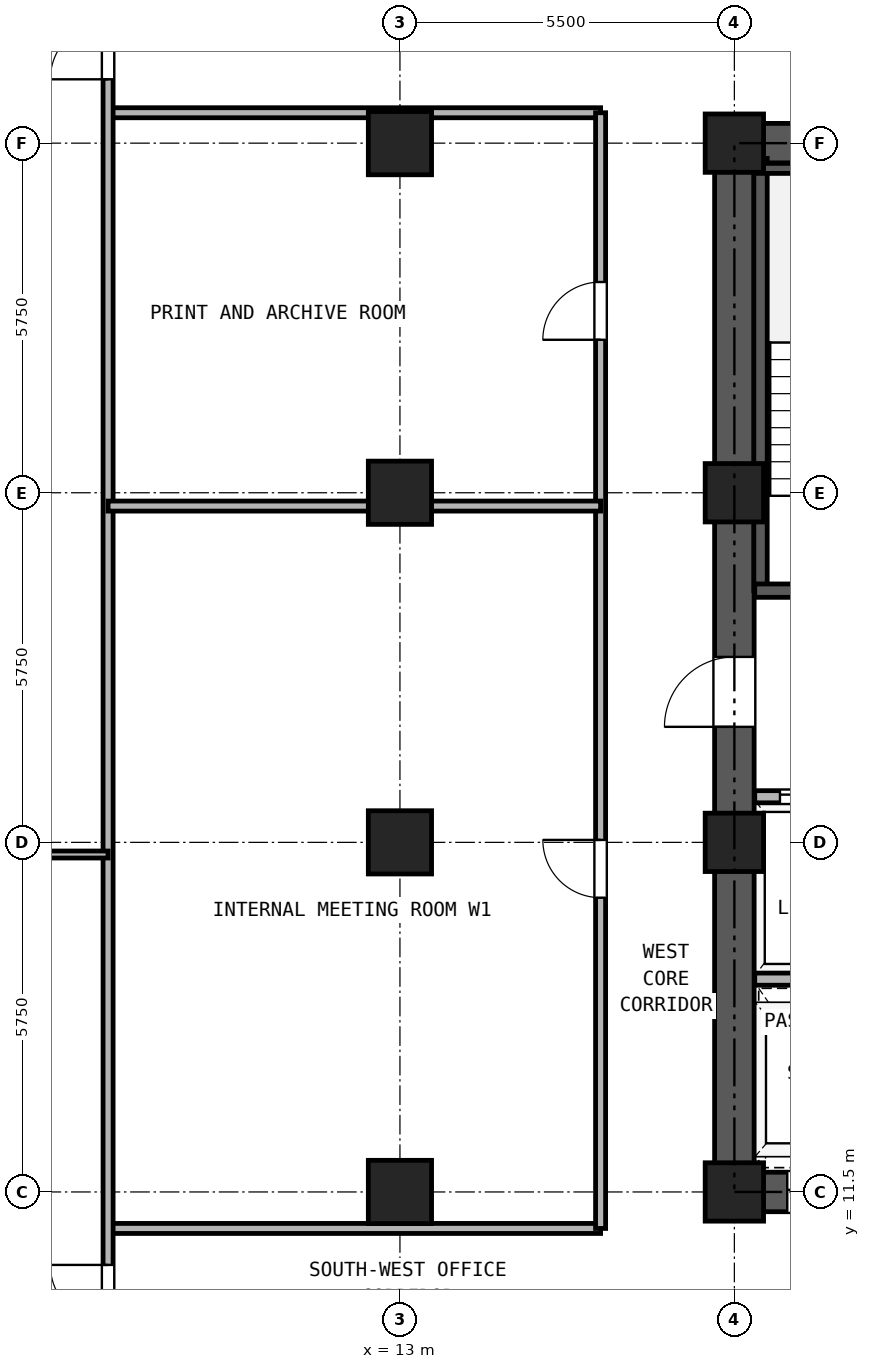
"""IFC4 building model, lengths in metres.
Left out: names, types, materials, properties, quantities, classifications, styles, units other than length and angle.
Written with IfcOpenShell. Run it as: python <this file> out.ifc"""

import sys

from ifc_helpers import new_model, si_unit, direction, frame, frame_2d, origin, origin_2d, place, context, subcontext, project, spatial, rectangle, hollow_rectangle, extrude, source, transform, mapped, element, fill, save


model = new_model("IFC4")
c1 = context("Model", 3, precision=1e-05, world=origin(), true_north=direction((0.0, 1.0)))
c2 = subcontext(c1, "Body", "Model", "MODEL_VIEW")
j1 = project(units=[si_unit("LENGTHUNIT", "METRE"), si_unit("PLANEANGLEUNIT", "RADIAN")], contexts=[c1])
p1 = place(None, origin())
s1 = spatial("IfcSite", under=j1, at=p1, CompositionType="ELEMENT")
p2 = place(p1, origin())
s2 = spatial("IfcBuilding", under=s1, at=p2, CompositionType="ELEMENT")
p3 = place(p2, frame((0.0, 0.0, 22.5)))
s3 = spatial("IfcBuildingStorey", under=s2, at=p3, CompositionType="ELEMENT", Elevation=22.5)
m1 = source(origin(), c2, "Body", "SweptSolid", [
    extrude(hollow_rectangle(XDim=1.04, YDim=1.04, WallThickness=0.065, at=origin_2d()), origin(), (0.0, 0.0, 1.0), 3.32),
])
for number, where, z_axis, x_axis in (
    (1, (13.0, 11.5, 0.0), (0.0, 0.0, 1.0), (1.0, 0.0, 0.0)),
    (2, (13.0, 17.25, 0.0), (0.0, 0.0, 1.0), (1.0, 0.0, 0.0)),
    (3, (13.0, 23.0, 0.0), (0.0, 0.0, 1.0), (1.0, 0.0, 0.0)),
    (4, (13.0, 28.75, 0.0), (0.0, 0.0, 1.0), (1.0, 0.0, 0.0)),
):
    element("IfcColumn", number, at=place(p3, frame(where, z_axis=z_axis, x_axis=x_axis)), inside=s3, PredefinedType="COLUMN", context=c2, shape_type="MappedRepresentation", body=[
        mapped(m1, transform((0.0, 0.0, 0.0), x_axis=(1.0, 0.0, 0.0), y_axis=(0.0, 1.0, 0.0), z_axis=(0.0, 0.0, 1.0), scale=1.0)),
    ])
m2 = source(origin(), c2, "Body", "SweptSolid", [
    extrude(hollow_rectangle(XDim=0.96, YDim=0.96, WallThickness=0.06, at=origin_2d()), origin(), (0.0, 0.0, 1.0), 3.32),
])
for number, where, z_axis, x_axis in (
    (5, (18.5, 11.5, 0.0), (0.0, 0.0, 1.0), (1.0, 0.0, 0.0)),
    (6, (18.5, 17.25, 0.0), (0.0, 0.0, 1.0), (1.0, 0.0, 0.0)),
    (7, (18.5, 23.0, 0.0), (0.0, 0.0, 1.0), (1.0, 0.0, 0.0)),
    (8, (18.5, 28.75, 0.0), (0.0, 0.0, 1.0), (1.0, 0.0, 0.0)),
):
    element("IfcColumn", number, at=place(p3, frame(where, z_axis=z_axis, x_axis=x_axis)), inside=s3, PredefinedType="COLUMN", context=c2, shape_type="MappedRepresentation", body=[
        mapped(m2, transform((0.0, 0.0, 0.0), x_axis=(1.0, 0.0, 0.0), y_axis=(0.0, 1.0, 0.0), z_axis=(0.0, 0.0, 1.0), scale=1.0)),
    ])
p4 = place(p3, frame((18.175, 11.5, 0.0), z_axis=(0.0, 0.0, 1.0), x_axis=(1.0, 0.0, 0.0)))
e9 = element("IfcWall", 9, at=p4, inside=s3, PredefinedType="SHEAR", context=c2, shape_type="SweptSolid", body=[
    extrude(rectangle(XDim=10.65, YDim=0.65, at=frame_2d((5.325, 0.0))), origin(), (0.0, 0.0, 1.0), 3.32),
])
p5 = place(p4, frame((1.195, 0.0, 0.0)))
e10 = element("IfcOpeningElement", 10, at=p5, cuts=e9, PredefinedType="OPENING", context=c2, shape_type="SweptSolid", body=[
    extrude(rectangle(XDim=1.1, YDim=2.25, at=frame_2d((0.55, 1.125))), frame((0.0, 0.335, 0.0), z_axis=(0.0, -1.0, 0.0), x_axis=(1.0, 0.0, 0.0)), (0.0, 0.0, 1.0), 0.67),
])
p6 = place(p4, frame((3.495, 0.0, 0.0)))
e11 = element("IfcOpeningElement", 11, at=p6, cuts=e9, PredefinedType="OPENING", context=c2, shape_type="SweptSolid", body=[
    extrude(rectangle(XDim=1.1, YDim=2.25, at=frame_2d((0.55, 1.125))), frame((0.0, 0.335, 0.0), z_axis=(0.0, -1.0, 0.0), x_axis=(1.0, 0.0, 0.0)), (0.0, 0.0, 1.0), 0.67),
])
p7 = place(p4, frame((5.925, 0.0, 0.0)))
e12 = element("IfcOpeningElement", 12, at=p7, cuts=e9, PredefinedType="OPENING", context=c2, shape_type="SweptSolid", body=[
    extrude(rectangle(XDim=1.1, YDim=2.25, at=frame_2d((0.55, 1.125))), frame((0.0, 0.335, 0.0), z_axis=(0.0, -1.0, 0.0), x_axis=(1.0, 0.0, 0.0)), (0.0, 0.0, 1.0), 0.67),
])
p8 = place(p4, frame((8.325, 0.0, 0.0)))
e13 = element("IfcOpeningElement", 13, at=p8, cuts=e9, PredefinedType="OPENING", context=c2, shape_type="SweptSolid", body=[
    extrude(rectangle(XDim=1.1, YDim=2.25, at=frame_2d((0.55, 1.125))), frame((0.0, 0.335, 0.0), z_axis=(0.0, -1.0, 0.0), x_axis=(1.0, 0.0, 0.0)), (0.0, 0.0, 1.0), 0.67),
])
p9 = place(p3, frame((18.175, 28.75, 0.0), z_axis=(0.0, 0.0, 1.0), x_axis=(1.0, 0.0, 0.0)))
e14 = element("IfcWall", 14, at=p9, inside=s3, PredefinedType="SHEAR", context=c2, shape_type="SweptSolid", body=[
    extrude(rectangle(XDim=10.65, YDim=0.65, at=frame_2d((5.325, 0.0))), origin(), (0.0, 0.0, 1.0), 3.32),
])
p10 = place(p9, frame((4.205, 0.0, 0.0)))
e15 = element("IfcOpeningElement", 15, at=p10, cuts=e14, PredefinedType="OPENING", context=c2, shape_type="SweptSolid", body=[
    extrude(rectangle(XDim=0.9, YDim=2.05, at=frame_2d((0.45, 1.025))), frame((0.0, 0.335, 0.0), z_axis=(0.0, -1.0, 0.0), x_axis=(1.0, 0.0, 0.0)), (0.0, 0.0, 1.0), 0.67),
])
p11 = place(p9, frame((5.745, 0.0, 0.0)))
e16 = element("IfcOpeningElement", 16, at=p11, cuts=e14, PredefinedType="OPENING", context=c2, shape_type="SweptSolid", body=[
    extrude(rectangle(XDim=0.9, YDim=2.05, at=frame_2d((0.45, 1.025))), frame((0.0, 0.335, 0.0), z_axis=(0.0, -1.0, 0.0), x_axis=(1.0, 0.0, 0.0)), (0.0, 0.0, 1.0), 0.67),
])
p12 = place(p3, frame((18.5, 11.825, 0.0), z_axis=(0.0, 0.0, 1.0), x_axis=(0.0, 1.0, 0.0)))
e17 = element("IfcWall", 17, at=p12, inside=s3, PredefinedType="SHEAR", context=c2, shape_type="SweptSolid", body=[
    extrude(rectangle(XDim=16.6, YDim=0.65, at=frame_2d((8.3, 0.0))), origin(), (0.0, 0.0, 1.0), 3.32),
])
p13 = place(p12, frame((7.325, 0.0, 0.0)))
e18 = element("IfcOpeningElement", 18, at=p13, cuts=e17, PredefinedType="OPENING", context=c2, shape_type="SweptSolid", body=[
    extrude(rectangle(XDim=1.15, YDim=2.2, at=frame_2d((0.575, 1.1))), frame((0.0, 0.335, 0.0), z_axis=(0.0, -1.0, 0.0), x_axis=(1.0, 0.0, 0.0)), (0.0, 0.0, 1.0), 0.67),
])
p14 = place(p3, frame((18.93, 21.39, 0.0), z_axis=(0.0, 0.0, 1.0), x_axis=(0.0, 1.0, 0.0)))
e19 = element("IfcWall", 19, at=p14, inside=s3, PredefinedType="SOLIDWALL", context=c2, shape_type="SweptSolid", body=[
    extrude(rectangle(XDim=7.11, YDim=0.22, at=frame_2d((3.555, 0.0))), origin(), (0.0, 0.0, 1.0), 3.32),
])
p15 = place(p3, frame((18.835, 28.335, 0.0), z_axis=(0.0, 0.0, 1.0), x_axis=(1.0, 0.0, 0.0)))
e20 = element("IfcWall", 20, at=p15, inside=s3, PredefinedType="PARTITIONING", context=c2, shape_type="SweptSolid", body=[
    extrude(rectangle(XDim=3.275, YDim=0.165, at=frame_2d((1.638, 0.0))), origin(), (0.0, 0.0, 1.0), 3.32),
])
p16 = place(p3, frame((18.835, 21.39, 0.0), z_axis=(0.0, 0.0, 1.0), x_axis=(1.0, 0.0, 0.0)))
e21 = element("IfcWall", 21, at=p16, inside=s3, PredefinedType="SOLIDWALL", context=c2, shape_type="SweptSolid", body=[
    extrude(rectangle(XDim=6.295, YDim=0.22, at=frame_2d((3.147, 0.0))), origin(), (0.0, 0.0, 1.0), 3.32),
])
p17 = place(p16, frame((1.015, 0.0, 0.0)))
e22 = element("IfcOpeningElement", 22, at=p17, cuts=e21, PredefinedType="OPENING", context=c2, shape_type="SweptSolid", body=[
    extrude(rectangle(XDim=1.15, YDim=2.2, at=frame_2d((0.575, 1.1))), frame((0.0, 0.12, 0.0), z_axis=(0.0, -1.0, 0.0), x_axis=(1.0, 0.0, 0.0)), (0.0, 0.0, 1.0), 0.24),
])
p18 = place(p16, frame((4.745, 0.0, 0.0)))
e23 = element("IfcOpeningElement", 23, at=p18, cuts=e21, PredefinedType="OPENING", context=c2, shape_type="SweptSolid", body=[
    extrude(rectangle(XDim=1.1, YDim=2.25, at=frame_2d((0.55, 1.125))), frame((0.0, 0.12, 0.0), z_axis=(0.0, -1.0, 0.0), x_axis=(1.0, 0.0, 0.0)), (0.0, 0.0, 1.0), 0.24),
])
p19 = place(p3, frame((18.835, 18.0, 0.0), z_axis=(0.0, 0.0, 1.0), x_axis=(1.0, 0.0, 0.0)))
e24 = element("IfcWall", 24, at=p19, inside=s3, PredefinedType="PARTITIONING", context=c2, shape_type="SweptSolid", body=[
    extrude(rectangle(XDim=9.33, YDim=0.2, at=frame_2d((4.665, 0.0))), origin(), (0.0, 0.0, 1.0), 3.32),
])
p20 = place(p19, frame((0.415, 0.0, 0.0)))
e25 = element("IfcOpeningElement", 25, at=p20, cuts=e24, PredefinedType="OPENING", context=c2, shape_type="SweptSolid", body=[
    extrude(rectangle(XDim=1.3, YDim=2.3, at=frame_2d((0.65, 1.15))), frame((0.0, 0.11, 0.0), z_axis=(0.0, -1.0, 0.0), x_axis=(1.0, 0.0, 0.0)), (0.0, 0.0, 1.0), 0.22),
])
p21 = place(p19, frame((2.515, 0.0, 0.0)))
e26 = element("IfcOpeningElement", 26, at=p21, cuts=e24, PredefinedType="OPENING", context=c2, shape_type="SweptSolid", body=[
    extrude(rectangle(XDim=1.3, YDim=2.3, at=frame_2d((0.65, 1.15))), frame((0.0, 0.11, 0.0), z_axis=(0.0, -1.0, 0.0), x_axis=(1.0, 0.0, 0.0)), (0.0, 0.0, 1.0), 0.22),
])
p22 = place(p19, frame((7.015, 0.0, 0.0)))
e27 = element("IfcOpeningElement", 27, at=p22, cuts=e24, PredefinedType="OPENING", context=c2, shape_type="SweptSolid", body=[
    extrude(rectangle(XDim=1.0, YDim=2.15, at=frame_2d((0.5, 1.075))), frame((0.0, 0.11, 0.0), z_axis=(0.0, -1.0, 0.0), x_axis=(1.0, 0.0, 0.0)), (0.0, 0.0, 1.0), 0.22),
])
p23 = place(p3, frame((18.835, 15.0, 0.0), z_axis=(0.0, 0.0, 1.0), x_axis=(1.0, 0.0, 0.0)))
e28 = element("IfcWall", 28, at=p23, inside=s3, PredefinedType="PARTITIONING", context=c2, shape_type="SweptSolid", body=[
    extrude(rectangle(XDim=9.33, YDim=0.2, at=frame_2d((4.665, 0.0))), origin(), (0.0, 0.0, 1.0), 3.32),
])
for number, where, z_axis, x_axis in (
    (29, (8.2, 10.9, 0.0), (0.0, 0.0, 1.0), (1.0, 0.0, 0.0)),
    (30, (8.2, 29.25, 0.0), (0.0, 0.0, 1.0), (1.0, 0.0, 0.0)),
):
    element("IfcWall", number, at=place(p3, frame(where, z_axis=z_axis, x_axis=x_axis)), inside=s3, PredefinedType="PARTITIONING", context=c2, shape_type="SweptSolid", body=[
        extrude(rectangle(XDim=8.1, YDim=0.165, at=frame_2d((4.05, 0.0))), origin(), (0.0, 0.0, 1.0), 3.32),
    ])
p24 = place(p3, frame((16.3, 10.9, 0.0), z_axis=(0.0, 0.0, 1.0), x_axis=(0.0, 1.0, 0.0)))
e31 = element("IfcWall", 31, at=p24, inside=s3, PredefinedType="PARTITIONING", context=c2, shape_type="SweptSolid", body=[
    extrude(rectangle(XDim=18.35, YDim=0.165, at=frame_2d((9.175, 0.0))), origin(), (0.0, 0.0, 1.0), 3.32),
])
p25 = place(p24, frame((5.44, 0.0, 0.0)))
e32 = element("IfcOpeningElement", 32, at=p25, cuts=e31, PredefinedType="OPENING", context=c2, shape_type="SweptSolid", body=[
    extrude(rectangle(XDim=0.95, YDim=2.15, at=frame_2d((0.475, 1.075))), frame((0.0, 0.093, 0.0), z_axis=(0.0, -1.0, 0.0), x_axis=(1.0, 0.0, 0.0)), (0.0, 0.0, 1.0), 0.185),
])
p26 = place(p24, frame((14.616, 0.0, 0.0)))
e33 = element("IfcOpeningElement", 33, at=p26, cuts=e31, PredefinedType="OPENING", context=c2, shape_type="SweptSolid", body=[
    extrude(rectangle(XDim=0.95, YDim=2.15, at=frame_2d((0.475, 1.075))), frame((0.0, 0.093, 0.0), z_axis=(0.0, -1.0, 0.0), x_axis=(1.0, 0.0, 0.0)), (0.0, 0.0, 1.0), 0.185),
])
p27 = place(p3, frame((8.2, 0.16, 0.0), z_axis=(0.0, 0.0, 1.0), x_axis=(0.0, 1.0, 0.0)))
e34 = element("IfcWall", 34, at=p27, inside=s3, PredefinedType="PARTITIONING", context=c2, shape_type="SweptSolid", body=[
    extrude(rectangle(XDim=40.18, YDim=0.165, at=frame_2d((20.09, 0.0))), origin(), (0.0, 0.0, 1.0), 3.32),
])
p28 = place(p27, frame((9.19, 0.0, 0.0)))
e35 = element("IfcOpeningElement", 35, at=p28, cuts=e34, PredefinedType="OPENING", context=c2, shape_type="SweptSolid", body=[
    extrude(rectangle(XDim=0.95, YDim=2.15, at=frame_2d((0.475, 1.075))), frame((0.0, 0.093, 0.0), z_axis=(0.0, -1.0, 0.0), x_axis=(1.0, 0.0, 0.0)), (0.0, 0.0, 1.0), 0.185),
])
p29 = place(p27, frame((29.64, 0.0, 0.0)))
e36 = element("IfcOpeningElement", 36, at=p29, cuts=e34, PredefinedType="OPENING", context=c2, shape_type="SweptSolid", body=[
    extrude(rectangle(XDim=0.95, YDim=2.15, at=frame_2d((0.475, 1.075))), frame((0.0, 0.093, 0.0), z_axis=(0.0, -1.0, 0.0), x_axis=(1.0, 0.0, 0.0)), (0.0, 0.0, 1.0), 0.185),
])
p30 = place(p3, frame((0.16, 17.05, 0.0), z_axis=(0.0, 0.0, 1.0), x_axis=(1.0, 0.0, 0.0)))
e37 = element("IfcWall", 37, at=p30, inside=s3, PredefinedType="PARTITIONING", context=c2, shape_type="SweptSolid", body=[
    extrude(rectangle(XDim=8.04, YDim=0.115, at=frame_2d((4.02, 0.0))), origin(), (0.0, 0.0, 1.0), 2.539),
])
p31 = place(p3, frame((8.2, 22.781, 0.0), z_axis=(0.0, 0.0, 1.0), x_axis=(1.0, 0.0, 0.0)))
e38 = element("IfcWall", 38, at=p31, inside=s3, PredefinedType="PARTITIONING", context=c2, shape_type="SweptSolid", body=[
    extrude(rectangle(XDim=8.1, YDim=0.165, at=frame_2d((4.05, 0.0))), origin(), (0.0, 0.0, 1.0), 2.539),
])
p32 = place(p20, origin())
e39 = element("IfcDoor", 39, at=p32, inside=s3, OperationType="DOUBLE_DOOR_SLIDING", PredefinedType="DOOR", context=c2, shape_type="SweptSolid", body=[
    extrude(rectangle(XDim=1.3, YDim=2.3, at=frame_2d((0.65, 1.15))), frame((0.0, 0.025, 0.0), z_axis=(0.0, -1.0, 0.0), x_axis=(1.0, 0.0, 0.0)), (0.0, 0.0, 1.0), 0.05),
])
fill(e25, e39)
p33 = place(p13, frame((1.15, 0.0, 0.0), z_axis=(0.0, 0.0, 1.0), x_axis=(-1.0, 0.0, 0.0)))
e40 = element("IfcDoor", 40, at=p33, inside=s3, OperationType="SINGLE_SWING_LEFT", PredefinedType="DOOR", context=c2, shape_type="SweptSolid", body=[
    extrude(rectangle(XDim=1.15, YDim=2.2, at=frame_2d((0.575, 1.1))), frame((0.0, 0.025, 0.0), z_axis=(0.0, -1.0, 0.0), x_axis=(1.0, 0.0, 0.0)), (0.0, 0.0, 1.0), 0.05),
])
fill(e18, e40)
p34 = place(p5, frame((1.1, 0.0, 0.0), z_axis=(0.0, 0.0, 1.0), x_axis=(-1.0, 0.0, 0.0)))
e41 = element("IfcDoor", 41, at=p34, inside=s3, OperationType="DOUBLE_DOOR_SLIDING", PredefinedType="DOOR", context=c2, shape_type="SweptSolid", body=[
    extrude(rectangle(XDim=1.1, YDim=2.25, at=frame_2d((0.55, 1.125))), frame((0.0, 0.025, 0.0), z_axis=(0.0, -1.0, 0.0), x_axis=(1.0, 0.0, 0.0)), (0.0, 0.0, 1.0), 0.05),
])
fill(e10, e41)
p35 = place(p28, frame((0.95, 0.0, 0.0), z_axis=(0.0, 0.0, 1.0), x_axis=(-1.0, 0.0, 0.0)))
e42 = element("IfcDoor", 42, at=p35, inside=s3, OperationType="SINGLE_SWING_RIGHT", PredefinedType="DOOR", context=c2, shape_type="SweptSolid", body=[
    extrude(rectangle(XDim=0.95, YDim=2.15, at=frame_2d((0.475, 1.075))), frame((0.0, 0.025, 0.0), z_axis=(0.0, -1.0, 0.0), x_axis=(1.0, 0.0, 0.0)), (0.0, 0.0, 1.0), 0.05),
])
fill(e35, e42)
p36 = place(p29, frame((0.95, 0.0, 0.0), z_axis=(0.0, 0.0, 1.0), x_axis=(-1.0, 0.0, 0.0)))
e43 = element("IfcDoor", 43, at=p36, inside=s3, OperationType="SINGLE_SWING_LEFT", PredefinedType="DOOR", context=c2, shape_type="SweptSolid", body=[
    extrude(rectangle(XDim=0.95, YDim=2.15, at=frame_2d((0.475, 1.075))), frame((0.0, 0.025, 0.0), z_axis=(0.0, -1.0, 0.0), x_axis=(1.0, 0.0, 0.0)), (0.0, 0.0, 1.0), 0.05),
])
fill(e36, e43)
p37 = place(p25, frame((0.95, 0.0, 0.0), z_axis=(0.0, 0.0, 1.0), x_axis=(-1.0, 0.0, 0.0)))
e44 = element("IfcDoor", 44, at=p37, inside=s3, OperationType="SINGLE_SWING_RIGHT", PredefinedType="DOOR", context=c2, shape_type="SweptSolid", body=[
    extrude(rectangle(XDim=0.95, YDim=2.15, at=frame_2d((0.475, 1.075))), frame((0.0, 0.025, 0.0), z_axis=(0.0, -1.0, 0.0), x_axis=(1.0, 0.0, 0.0)), (0.0, 0.0, 1.0), 0.05),
])
fill(e32, e44)
p38 = place(p26, frame((0.95, 0.0, 0.0), z_axis=(0.0, 0.0, 1.0), x_axis=(-1.0, 0.0, 0.0)))
e45 = element("IfcDoor", 45, at=p38, inside=s3, OperationType="SINGLE_SWING_LEFT", PredefinedType="DOOR", context=c2, shape_type="SweptSolid", body=[
    extrude(rectangle(XDim=0.95, YDim=2.15, at=frame_2d((0.475, 1.075))), frame((0.0, 0.025, 0.0), z_axis=(0.0, -1.0, 0.0), x_axis=(1.0, 0.0, 0.0)), (0.0, 0.0, 1.0), 0.05),
])
fill(e33, e45)
save(model, sys.argv[1])
